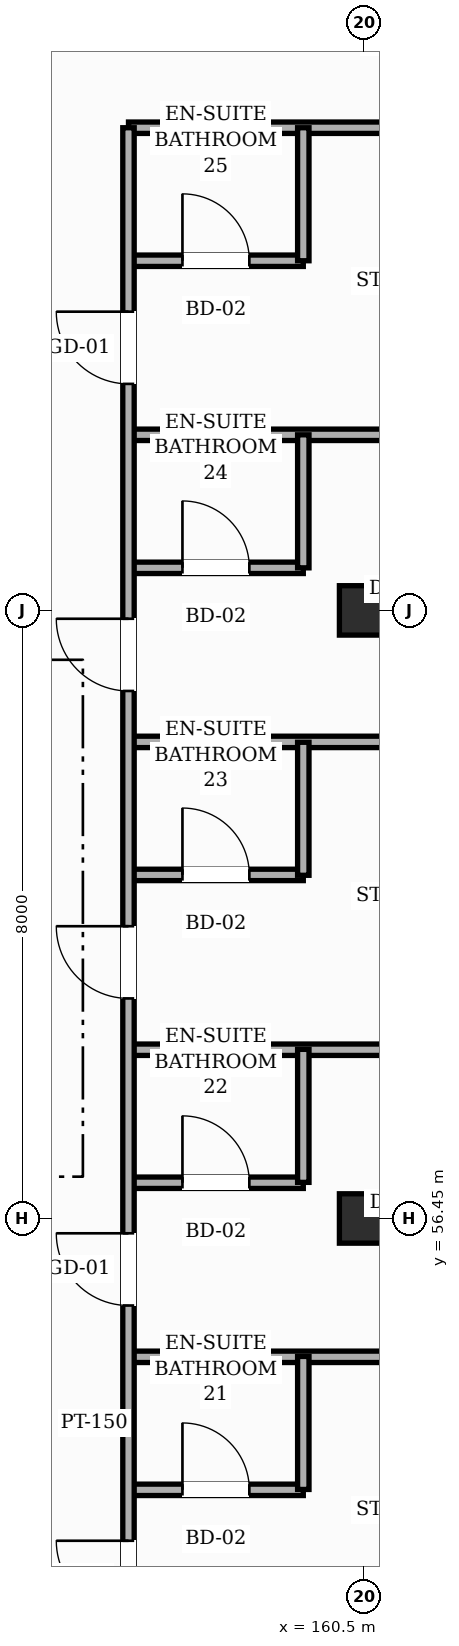
"""IFC4 building model, lengths in metres.
Left out: names, types, materials, properties, quantities, classifications, styles, units other than length and angle.
Written with IfcOpenShell. Run it as: python <this file> out.ifc"""

import sys

from ifc_helpers import new_model, si_unit, direction, frame, frame_2d, origin, origin_2d, place, context, subcontext, project, spatial, rectangle, hollow_rectangle, extrude, element, fill, save


model = new_model("IFC4")
c1 = context("Model", 3, precision=1e-05, world=origin(), true_north=direction((0.0, 1.0)))
c2 = subcontext(c1, "Body", "Model", "MODEL_VIEW")
j1 = project(units=[si_unit("LENGTHUNIT", "METRE"), si_unit("PLANEANGLEUNIT", "RADIAN")], contexts=[c1])
p1 = place(None, origin())
s1 = spatial("IfcSite", under=j1, at=p1, CompositionType="ELEMENT")
p2 = place(p1, origin())
s2 = spatial("IfcBuilding", under=s1, at=p2, CompositionType="ELEMENT")
p3 = place(p2, frame((0.0, 0.0, 15.0)))
s3 = spatial("IfcBuildingStorey", under=s2, at=p3, CompositionType="ELEMENT", Elevation=15.0)
for number, where, z_axis, x_axis in (
    (1, (160.5, 56.45, 0.0), (0.0, 0.0, 1.0), (1.0, 0.0, 0.0)),
    (2, (160.5, 64.45, 0.0), (0.0, 0.0, 1.0), (1.0, 0.0, 0.0)),
):
    element("IfcColumn", number, at=place(p3, frame(where, z_axis=z_axis, x_axis=x_axis)), inside=s3, PredefinedType="COLUMN", context=c2, shape_type="SweptSolid", body=[
        extrude(hollow_rectangle(XDim=0.65, YDim=0.65, WallThickness=0.025, InnerFilletRadius=0.025, OuterFilletRadius=0.05, at=origin_2d()), origin(), (0.0, 0.0, 1.0), 4.8),
    ])
p4 = place(p3, frame((157.4, 52.88, 0.0), z_axis=(0.0, 0.0, 1.0), x_axis=(1.0, 0.0, 0.0)))
e3 = element("IfcWall", 3, at=p4, inside=s3, PredefinedType="PARTITIONING", context=c2, shape_type="SweptSolid", body=[
    extrude(rectangle(XDim=2.3, YDim=0.15, at=frame_2d((1.15, 0.0))), origin(), (0.0, 0.0, 1.0), 4.545),
])
p5 = place(p4, frame((0.71, 0.0, 0.0)))
e4 = element("IfcOpeningElement", 4, at=p5, cuts=e3, PredefinedType="OPENING", context=c2, shape_type="SweptSolid", body=[
    extrude(rectangle(XDim=0.88, YDim=2.12, at=frame_2d((0.44, 1.06))), frame((0.0, 0.085, 0.0), z_axis=(0.0, -1.0, 0.0), x_axis=(1.0, 0.0, 0.0)), (0.0, 0.0, 1.0), 0.17),
])
p6 = place(p3, frame((157.4, 54.63, 0.0), z_axis=(0.0, 0.0, 1.0), x_axis=(1.0, 0.0, 0.0)))
e5 = element("IfcWall", 5, at=p6, inside=s3, PredefinedType="PARTITIONING", context=c2, shape_type="SweptSolid", body=[
    extrude(rectangle(XDim=9.8, YDim=0.15, at=frame_2d((4.9, 0.0))), origin(), (0.0, 0.0, 1.0), 4.545),
])
p7 = place(p3, frame((157.4, 56.92, 0.0), z_axis=(0.0, 0.0, 1.0), x_axis=(1.0, 0.0, 0.0)))
e6 = element("IfcWall", 6, at=p7, inside=s3, PredefinedType="PARTITIONING", context=c2, shape_type="SweptSolid", body=[
    extrude(rectangle(XDim=2.3, YDim=0.15, at=frame_2d((1.15, 0.0))), origin(), (0.0, 0.0, 1.0), 4.545),
])
p8 = place(p7, frame((0.71, 0.0, 0.0)))
e7 = element("IfcOpeningElement", 7, at=p8, cuts=e6, PredefinedType="OPENING", context=c2, shape_type="SweptSolid", body=[
    extrude(rectangle(XDim=0.88, YDim=2.12, at=frame_2d((0.44, 1.06))), frame((0.0, 0.085, 0.0), z_axis=(0.0, -1.0, 0.0), x_axis=(1.0, 0.0, 0.0)), (0.0, 0.0, 1.0), 0.17),
])
p9 = place(p3, frame((157.4, 58.67, 0.0), z_axis=(0.0, 0.0, 1.0), x_axis=(1.0, 0.0, 0.0)))
e8 = element("IfcWall", 8, at=p9, inside=s3, PredefinedType="PARTITIONING", context=c2, shape_type="SweptSolid", body=[
    extrude(rectangle(XDim=9.8, YDim=0.15, at=frame_2d((4.9, 0.0))), origin(), (0.0, 0.0, 1.0), 4.545),
])
p10 = place(p3, frame((157.4, 60.97, 0.0), z_axis=(0.0, 0.0, 1.0), x_axis=(1.0, 0.0, 0.0)))
e9 = element("IfcWall", 9, at=p10, inside=s3, PredefinedType="PARTITIONING", context=c2, shape_type="SweptSolid", body=[
    extrude(rectangle(XDim=2.3, YDim=0.15, at=frame_2d((1.15, 0.0))), origin(), (0.0, 0.0, 1.0), 4.545),
])
p11 = place(p10, frame((0.71, 0.0, 0.0)))
e10 = element("IfcOpeningElement", 10, at=p11, cuts=e9, PredefinedType="OPENING", context=c2, shape_type="SweptSolid", body=[
    extrude(rectangle(XDim=0.88, YDim=2.12, at=frame_2d((0.44, 1.06))), frame((0.0, 0.085, 0.0), z_axis=(0.0, -1.0, 0.0), x_axis=(1.0, 0.0, 0.0)), (0.0, 0.0, 1.0), 0.17),
])
p12 = place(p3, frame((157.4, 62.72, 0.0), z_axis=(0.0, 0.0, 1.0), x_axis=(1.0, 0.0, 0.0)))
e11 = element("IfcWall", 11, at=p12, inside=s3, PredefinedType="PARTITIONING", context=c2, shape_type="SweptSolid", body=[
    extrude(rectangle(XDim=9.8, YDim=0.15, at=frame_2d((4.9, 0.0))), origin(), (0.0, 0.0, 1.0), 4.545),
])
p13 = place(p3, frame((157.4, 65.01, 0.0), z_axis=(0.0, 0.0, 1.0), x_axis=(1.0, 0.0, 0.0)))
e12 = element("IfcWall", 12, at=p13, inside=s3, PredefinedType="PARTITIONING", context=c2, shape_type="SweptSolid", body=[
    extrude(rectangle(XDim=2.3, YDim=0.15, at=frame_2d((1.15, 0.0))), origin(), (0.0, 0.0, 1.0), 4.545),
])
p14 = place(p13, frame((0.71, 0.0, 0.0)))
e13 = element("IfcOpeningElement", 13, at=p14, cuts=e12, PredefinedType="OPENING", context=c2, shape_type="SweptSolid", body=[
    extrude(rectangle(XDim=0.88, YDim=2.12, at=frame_2d((0.44, 1.06))), frame((0.0, 0.085, 0.0), z_axis=(0.0, -1.0, 0.0), x_axis=(1.0, 0.0, 0.0)), (0.0, 0.0, 1.0), 0.17),
])
p15 = place(p3, frame((157.4, 66.76, 0.0), z_axis=(0.0, 0.0, 1.0), x_axis=(1.0, 0.0, 0.0)))
e14 = element("IfcWall", 14, at=p15, inside=s3, PredefinedType="PARTITIONING", context=c2, shape_type="SweptSolid", body=[
    extrude(rectangle(XDim=9.8, YDim=0.15, at=frame_2d((4.9, 0.0))), origin(), (0.0, 0.0, 1.0), 4.545),
])
p16 = place(p3, frame((157.4, 69.05, 0.0), z_axis=(0.0, 0.0, 1.0), x_axis=(1.0, 0.0, 0.0)))
e15 = element("IfcWall", 15, at=p16, inside=s3, PredefinedType="PARTITIONING", context=c2, shape_type="SweptSolid", body=[
    extrude(rectangle(XDim=2.3, YDim=0.15, at=frame_2d((1.15, 0.0))), origin(), (0.0, 0.0, 1.0), 4.545),
])
p17 = place(p16, frame((0.71, 0.0, 0.0)))
e16 = element("IfcOpeningElement", 16, at=p17, cuts=e15, PredefinedType="OPENING", context=c2, shape_type="SweptSolid", body=[
    extrude(rectangle(XDim=0.88, YDim=2.12, at=frame_2d((0.44, 1.06))), frame((0.0, 0.085, 0.0), z_axis=(0.0, -1.0, 0.0), x_axis=(1.0, 0.0, 0.0)), (0.0, 0.0, 1.0), 0.17),
])
p18 = place(p3, frame((157.4, 70.8, 0.0), z_axis=(0.0, 0.0, 1.0), x_axis=(1.0, 0.0, 0.0)))
e17 = element("IfcWall", 17, at=p18, inside=s3, PredefinedType="PARTITIONING", context=c2, shape_type="SweptSolid", body=[
    extrude(rectangle(XDim=9.8, YDim=0.15, at=frame_2d((4.9, 0.0))), origin(), (0.0, 0.0, 1.0), 4.545),
])
p19 = place(p3, frame((157.4, 22.3, 0.0), z_axis=(0.0, 0.0, 1.0), x_axis=(0.0, 1.0, 0.0)))
e18 = element("IfcWall", 18, at=p19, inside=s3, PredefinedType="PARTITIONING", context=c2, shape_type="SweptSolid", body=[
    extrude(rectangle(XDim=48.5, YDim=0.15, at=frame_2d((24.25, 0.0))), origin(), (0.0, 0.0, 1.0), 4.545),
])
p20 = place(p19, frame((0.67, 0.0, 0.0)))
e19 = element("IfcOpeningElement", 19, at=p20, cuts=e18, PredefinedType="OPENING", context=c2, shape_type="SweptSolid", body=[
    extrude(rectangle(XDim=0.95, YDim=2.15, at=frame_2d((0.475, 1.075))), frame((0.0, 0.085, 0.0), z_axis=(0.0, -1.0, 0.0), x_axis=(1.0, 0.0, 0.0)), (0.0, 0.0, 1.0), 0.17),
])
p21 = place(p19, frame((4.71, 0.0, 0.0)))
e20 = element("IfcOpeningElement", 20, at=p21, cuts=e18, PredefinedType="OPENING", context=c2, shape_type="SweptSolid", body=[
    extrude(rectangle(XDim=0.95, YDim=2.15, at=frame_2d((0.475, 1.075))), frame((0.0, 0.085, 0.0), z_axis=(0.0, -1.0, 0.0), x_axis=(1.0, 0.0, 0.0)), (0.0, 0.0, 1.0), 0.17),
])
p22 = place(p19, frame((8.755, 0.0, 0.0)))
e21 = element("IfcOpeningElement", 21, at=p22, cuts=e18, PredefinedType="OPENING", context=c2, shape_type="SweptSolid", body=[
    extrude(rectangle(XDim=0.95, YDim=2.15, at=frame_2d((0.475, 1.075))), frame((0.0, 0.085, 0.0), z_axis=(0.0, -1.0, 0.0), x_axis=(1.0, 0.0, 0.0)), (0.0, 0.0, 1.0), 0.17),
])
p23 = place(p19, frame((12.795, 0.0, 0.0)))
e22 = element("IfcOpeningElement", 22, at=p23, cuts=e18, PredefinedType="OPENING", context=c2, shape_type="SweptSolid", body=[
    extrude(rectangle(XDim=0.95, YDim=2.15, at=frame_2d((0.475, 1.075))), frame((0.0, 0.085, 0.0), z_axis=(0.0, -1.0, 0.0), x_axis=(1.0, 0.0, 0.0)), (0.0, 0.0, 1.0), 0.17),
])
p24 = place(p19, frame((16.835, 0.0, 0.0)))
e23 = element("IfcOpeningElement", 23, at=p24, cuts=e18, PredefinedType="OPENING", context=c2, shape_type="SweptSolid", body=[
    extrude(rectangle(XDim=0.95, YDim=2.15, at=frame_2d((0.475, 1.075))), frame((0.0, 0.085, 0.0), z_axis=(0.0, -1.0, 0.0), x_axis=(1.0, 0.0, 0.0)), (0.0, 0.0, 1.0), 0.17),
])
p25 = place(p19, frame((20.88, 0.0, 0.0)))
e24 = element("IfcOpeningElement", 24, at=p25, cuts=e18, PredefinedType="OPENING", context=c2, shape_type="SweptSolid", body=[
    extrude(rectangle(XDim=0.95, YDim=2.15, at=frame_2d((0.475, 1.075))), frame((0.0, 0.085, 0.0), z_axis=(0.0, -1.0, 0.0), x_axis=(1.0, 0.0, 0.0)), (0.0, 0.0, 1.0), 0.17),
])
p26 = place(p19, frame((24.92, 0.0, 0.0)))
e25 = element("IfcOpeningElement", 25, at=p26, cuts=e18, PredefinedType="OPENING", context=c2, shape_type="SweptSolid", body=[
    extrude(rectangle(XDim=0.95, YDim=2.15, at=frame_2d((0.475, 1.075))), frame((0.0, 0.085, 0.0), z_axis=(0.0, -1.0, 0.0), x_axis=(1.0, 0.0, 0.0)), (0.0, 0.0, 1.0), 0.17),
])
p27 = place(p19, frame((28.96, 0.0, 0.0)))
e26 = element("IfcOpeningElement", 26, at=p27, cuts=e18, PredefinedType="OPENING", context=c2, shape_type="SweptSolid", body=[
    extrude(rectangle(XDim=0.95, YDim=2.15, at=frame_2d((0.475, 1.075))), frame((0.0, 0.085, 0.0), z_axis=(0.0, -1.0, 0.0), x_axis=(1.0, 0.0, 0.0)), (0.0, 0.0, 1.0), 0.17),
])
p28 = place(p19, frame((33.005, 0.0, 0.0)))
e27 = element("IfcOpeningElement", 27, at=p28, cuts=e18, PredefinedType="OPENING", context=c2, shape_type="SweptSolid", body=[
    extrude(rectangle(XDim=0.95, YDim=2.15, at=frame_2d((0.475, 1.075))), frame((0.0, 0.085, 0.0), z_axis=(0.0, -1.0, 0.0), x_axis=(1.0, 0.0, 0.0)), (0.0, 0.0, 1.0), 0.17),
])
p29 = place(p19, frame((37.045, 0.0, 0.0)))
e28 = element("IfcOpeningElement", 28, at=p29, cuts=e18, PredefinedType="OPENING", context=c2, shape_type="SweptSolid", body=[
    extrude(rectangle(XDim=0.95, YDim=2.15, at=frame_2d((0.475, 1.075))), frame((0.0, 0.085, 0.0), z_axis=(0.0, -1.0, 0.0), x_axis=(1.0, 0.0, 0.0)), (0.0, 0.0, 1.0), 0.17),
])
p30 = place(p19, frame((41.09, 0.0, 0.0)))
e29 = element("IfcOpeningElement", 29, at=p30, cuts=e18, PredefinedType="OPENING", context=c2, shape_type="SweptSolid", body=[
    extrude(rectangle(XDim=0.95, YDim=2.15, at=frame_2d((0.475, 1.075))), frame((0.0, 0.085, 0.0), z_axis=(0.0, -1.0, 0.0), x_axis=(1.0, 0.0, 0.0)), (0.0, 0.0, 1.0), 0.17),
])
p31 = place(p19, frame((45.13, 0.0, 0.0)))
e30 = element("IfcOpeningElement", 30, at=p31, cuts=e18, PredefinedType="OPENING", context=c2, shape_type="SweptSolid", body=[
    extrude(rectangle(XDim=0.95, YDim=2.15, at=frame_2d((0.475, 1.075))), frame((0.0, 0.085, 0.0), z_axis=(0.0, -1.0, 0.0), x_axis=(1.0, 0.0, 0.0)), (0.0, 0.0, 1.0), 0.17),
])
for number, where, z_axis, x_axis in (
    (31, (159.7, 52.885, 0.0), (0.0, 0.0, 1.0), (0.0, 1.0, 0.0)),
    (32, (159.7, 56.925, 0.0), (0.0, 0.0, 1.0), (0.0, 1.0, 0.0)),
    (33, (159.7, 60.965, 0.0), (0.0, 0.0, 1.0), (0.0, 1.0, 0.0)),
    (34, (159.7, 65.01, 0.0), (0.0, 0.0, 1.0), (0.0, 1.0, 0.0)),
    (35, (159.7, 69.05, 0.0), (0.0, 0.0, 1.0), (0.0, 1.0, 0.0)),
):
    element("IfcWall", number, at=place(p3, frame(where, z_axis=z_axis, x_axis=x_axis)), inside=s3, PredefinedType="PARTITIONING", context=c2, shape_type="SweptSolid", body=[
        extrude(rectangle(XDim=1.75, YDim=0.15, at=frame_2d((0.875, 0.0))), origin(), (0.0, 0.0, 1.0), 4.545),
    ])
p32 = place(p27, origin())
e36 = element("IfcDoor", 36, at=p32, inside=s3, OperationType="SINGLE_SWING_RIGHT", PredefinedType="DOOR", context=c2, shape_type="SweptSolid", body=[
    extrude(rectangle(XDim=0.95, YDim=2.15, at=frame_2d((0.475, 1.075))), frame((0.0, 0.025, 0.0), z_axis=(0.0, -1.0, 0.0), x_axis=(1.0, 0.0, 0.0)), (0.0, 0.0, 1.0), 0.05),
])
fill(e26, e36)
p33 = place(p5, origin())
e37 = element("IfcDoor", 37, at=p33, inside=s3, OperationType="SINGLE_SWING_LEFT", PredefinedType="DOOR", context=c2, shape_type="SweptSolid", body=[
    extrude(rectangle(XDim=0.88, YDim=2.12, at=frame_2d((0.44, 1.06))), frame((0.0, 0.025, 0.0), z_axis=(0.0, -1.0, 0.0), x_axis=(1.0, 0.0, 0.0)), (0.0, 0.0, 1.0), 0.05),
])
fill(e4, e37)
p34 = place(p28, origin())
e38 = element("IfcDoor", 38, at=p34, inside=s3, OperationType="SINGLE_SWING_RIGHT", PredefinedType="DOOR", context=c2, shape_type="SweptSolid", body=[
    extrude(rectangle(XDim=0.95, YDim=2.15, at=frame_2d((0.475, 1.075))), frame((0.0, 0.025, 0.0), z_axis=(0.0, -1.0, 0.0), x_axis=(1.0, 0.0, 0.0)), (0.0, 0.0, 1.0), 0.05),
])
fill(e27, e38)
p35 = place(p8, origin())
e39 = element("IfcDoor", 39, at=p35, inside=s3, OperationType="SINGLE_SWING_LEFT", PredefinedType="DOOR", context=c2, shape_type="SweptSolid", body=[
    extrude(rectangle(XDim=0.88, YDim=2.12, at=frame_2d((0.44, 1.06))), frame((0.0, 0.025, 0.0), z_axis=(0.0, -1.0, 0.0), x_axis=(1.0, 0.0, 0.0)), (0.0, 0.0, 1.0), 0.05),
])
fill(e7, e39)
p36 = place(p29, origin())
e40 = element("IfcDoor", 40, at=p36, inside=s3, OperationType="SINGLE_SWING_RIGHT", PredefinedType="DOOR", context=c2, shape_type="SweptSolid", body=[
    extrude(rectangle(XDim=0.95, YDim=2.15, at=frame_2d((0.475, 1.075))), frame((0.0, 0.025, 0.0), z_axis=(0.0, -1.0, 0.0), x_axis=(1.0, 0.0, 0.0)), (0.0, 0.0, 1.0), 0.05),
])
fill(e28, e40)
p37 = place(p11, origin())
e41 = element("IfcDoor", 41, at=p37, inside=s3, OperationType="SINGLE_SWING_LEFT", PredefinedType="DOOR", context=c2, shape_type="SweptSolid", body=[
    extrude(rectangle(XDim=0.88, YDim=2.12, at=frame_2d((0.44, 1.06))), frame((0.0, 0.025, 0.0), z_axis=(0.0, -1.0, 0.0), x_axis=(1.0, 0.0, 0.0)), (0.0, 0.0, 1.0), 0.05),
])
fill(e10, e41)
p38 = place(p30, origin())
e42 = element("IfcDoor", 42, at=p38, inside=s3, OperationType="SINGLE_SWING_RIGHT", PredefinedType="DOOR", context=c2, shape_type="SweptSolid", body=[
    extrude(rectangle(XDim=0.95, YDim=2.15, at=frame_2d((0.475, 1.075))), frame((0.0, 0.025, 0.0), z_axis=(0.0, -1.0, 0.0), x_axis=(1.0, 0.0, 0.0)), (0.0, 0.0, 1.0), 0.05),
])
fill(e29, e42)
p39 = place(p14, origin())
e43 = element("IfcDoor", 43, at=p39, inside=s3, OperationType="SINGLE_SWING_LEFT", PredefinedType="DOOR", context=c2, shape_type="SweptSolid", body=[
    extrude(rectangle(XDim=0.88, YDim=2.12, at=frame_2d((0.44, 1.06))), frame((0.0, 0.025, 0.0), z_axis=(0.0, -1.0, 0.0), x_axis=(1.0, 0.0, 0.0)), (0.0, 0.0, 1.0), 0.05),
])
fill(e13, e43)
p40 = place(p31, origin())
e44 = element("IfcDoor", 44, at=p40, inside=s3, OperationType="SINGLE_SWING_RIGHT", PredefinedType="DOOR", context=c2, shape_type="SweptSolid", body=[
    extrude(rectangle(XDim=0.95, YDim=2.15, at=frame_2d((0.475, 1.075))), frame((0.0, 0.025, 0.0), z_axis=(0.0, -1.0, 0.0), x_axis=(1.0, 0.0, 0.0)), (0.0, 0.0, 1.0), 0.05),
])
fill(e30, e44)
p41 = place(p17, origin())
e45 = element("IfcDoor", 45, at=p41, inside=s3, OperationType="SINGLE_SWING_LEFT", PredefinedType="DOOR", context=c2, shape_type="SweptSolid", body=[
    extrude(rectangle(XDim=0.88, YDim=2.12, at=frame_2d((0.44, 1.06))), frame((0.0, 0.025, 0.0), z_axis=(0.0, -1.0, 0.0), x_axis=(1.0, 0.0, 0.0)), (0.0, 0.0, 1.0), 0.05),
])
fill(e16, e45)
save(model, sys.argv[1])
